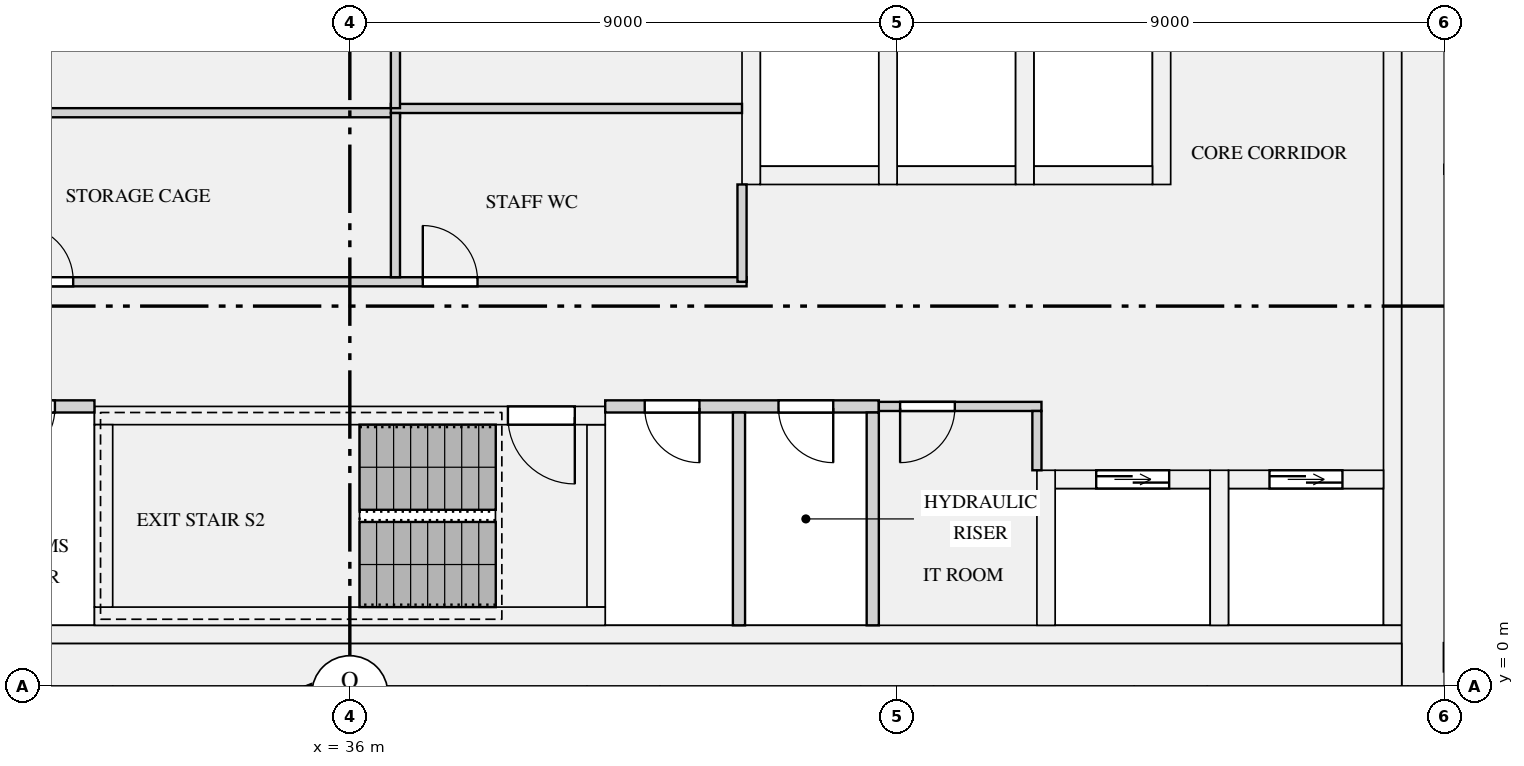
"""IFC4 building model, lengths in metres.
Left out: names, types, materials, properties, quantities, classifications, styles, units other than length and angle.
Written with IfcOpenShell. Run it as: python <this file> out.ifc"""

import sys

from ifc_helpers import new_model, si_unit, direction, frame, frame_2d, origin, place, context, subcontext, project, spatial, rectangle, extrude, element, fill, save


model = new_model("IFC4")
c1 = context("Model", 3, precision=1e-05, world=origin(), true_north=direction((0.0, 1.0)))
c2 = subcontext(c1, "Body", "Model", "MODEL_VIEW")
j1 = project(units=[si_unit("LENGTHUNIT", "METRE"), si_unit("PLANEANGLEUNIT", "RADIAN")], contexts=[c1])
p1 = place(None, origin())
s1 = spatial("IfcSite", under=j1, at=p1, CompositionType="ELEMENT")
p2 = place(p1, origin())
s2 = spatial("IfcBuilding", under=s1, at=p2, CompositionType="ELEMENT")
p3 = place(p2, frame((0.0, 0.0, 179.1)))
s3 = spatial("IfcBuildingStorey", under=s2, at=p3, CompositionType="ELEMENT", Elevation=179.1)
p4 = place(p3, frame((53.65, 0.0, 0.0), z_axis=(0.0, 0.0, 1.0), x_axis=(0.0, 1.0, 0.0)))
e1 = element("IfcWall", 1, at=p4, inside=s3, PredefinedType="SHEAR", context=c2, shape_type="SweptSolid", body=[
    extrude(rectangle(XDim=12.5, YDim=0.7, at=frame_2d((6.25, 0.0))), origin(), (0.0, 0.0, 1.0), 3.15),
])
p5 = place(p3, frame((18.7, 0.35, 0.0), z_axis=(0.0, 0.0, 1.0), x_axis=(1.0, 0.0, 0.0)))
e2 = element("IfcWall", 2, at=p5, inside=s3, PredefinedType="SHEAR", context=c2, shape_type="SweptSolid", body=[
    extrude(rectangle(XDim=34.6, YDim=0.7, at=frame_2d((17.3, 0.0))), origin(), (0.0, 0.0, 1.0), 3.15),
])
p6 = place(p3, frame((53.15, 1.0, 0.0), z_axis=(0.0, 0.0, 1.0), x_axis=(0.0, 1.0, 0.0)))
e3 = element("IfcWall", 3, at=p6, inside=s3, PredefinedType="SHEAR", context=c2, shape_type="SweptSolid", body=[
    extrude(rectangle(XDim=10.9, YDim=0.3, at=frame_2d((5.45, 0.0))), origin(), (0.0, 0.0, 1.0), 3.15),
])
p7 = place(p3, frame((18.7, 0.85, 0.0), z_axis=(0.0, 0.0, 1.0), x_axis=(1.0, 0.0, 0.0)))
e4 = element("IfcWall", 4, at=p7, inside=s3, PredefinedType="SHEAR", context=c2, shape_type="SweptSolid", body=[
    extrude(rectangle(XDim=34.6, YDim=0.3, at=frame_2d((17.3, 0.0))), origin(), (0.0, 0.0, 1.0), 3.15),
])
p8 = place(p3, frame((42.75, 8.4, 0.0), z_axis=(0.0, 0.0, 1.0), x_axis=(1.0, 0.0, 0.0)))
e5 = element("IfcWall", 5, at=p8, inside=s3, PredefinedType="SHEAR", context=c2, shape_type="SweptSolid", body=[
    extrude(rectangle(XDim=1.95, YDim=0.3, at=frame_2d((0.975, 0.0))), origin(), (0.0, 0.0, 1.0), 3.15),
])
p9 = place(p3, frame((42.6, 8.25, 0.0), z_axis=(0.0, 0.0, 1.0), x_axis=(0.0, 1.0, 0.0)))
e6 = element("IfcWall", 6, at=p9, inside=s3, PredefinedType="SHEAR", context=c2, shape_type="SweptSolid", body=[
    extrude(rectangle(XDim=3.65, YDim=0.3, at=frame_2d((1.825, 0.0))), origin(), (0.0, 0.0, 1.0), 3.15),
])
p10 = place(p3, frame((45.0, 8.4, 0.0), z_axis=(0.0, 0.0, 1.0), x_axis=(1.0, 0.0, 0.0)))
e7 = element("IfcWall", 7, at=p10, inside=s3, PredefinedType="SHEAR", context=c2, shape_type="SweptSolid", body=[
    extrude(rectangle(XDim=1.95, YDim=0.3, at=frame_2d((0.975, 0.0))), origin(), (0.0, 0.0, 1.0), 3.15),
])
p11 = place(p3, frame((44.85, 8.25, 0.0), z_axis=(0.0, 0.0, 1.0), x_axis=(0.0, 1.0, 0.0)))
e8 = element("IfcWall", 8, at=p11, inside=s3, PredefinedType="SHEAR", context=c2, shape_type="SweptSolid", body=[
    extrude(rectangle(XDim=3.65, YDim=0.3, at=frame_2d((1.825, 0.0))), origin(), (0.0, 0.0, 1.0), 3.15),
])
p12 = place(p3, frame((47.25, 8.4, 0.0), z_axis=(0.0, 0.0, 1.0), x_axis=(1.0, 0.0, 0.0)))
e9 = element("IfcWall", 9, at=p12, inside=s3, PredefinedType="SHEAR", context=c2, shape_type="SweptSolid", body=[
    extrude(rectangle(XDim=1.95, YDim=0.3, at=frame_2d((0.975, 0.0))), origin(), (0.0, 0.0, 1.0), 3.15),
])
for number, where, z_axis, x_axis in (
    (10, (47.1, 8.25, 0.0), (0.0, 0.0, 1.0), (0.0, 1.0, 0.0)),
    (11, (49.35, 8.25, 0.0), (0.0, 0.0, 1.0), (0.0, 1.0, 0.0)),
):
    element("IfcWall", number, at=place(p3, frame(where, z_axis=z_axis, x_axis=x_axis)), inside=s3, PredefinedType="SHEAR", context=c2, shape_type="SweptSolid", body=[
        extrude(rectangle(XDim=3.65, YDim=0.3, at=frame_2d((1.825, 0.0))), origin(), (0.0, 0.0, 1.0), 3.15),
    ])
p13 = place(p3, frame((47.6, 3.4, 0.0), z_axis=(0.0, 0.0, 1.0), x_axis=(1.0, 0.0, 0.0)))
e12 = element("IfcWall", 12, at=p13, inside=s3, PredefinedType="SHEAR", context=c2, shape_type="SweptSolid", body=[
    extrude(rectangle(XDim=2.55, YDim=0.3, at=frame_2d((1.275, 0.0))), origin(), (0.0, 0.0, 1.0), 3.15),
])
p14 = place(p13, frame((0.675, 0.0, 0.0)))
e13 = element("IfcOpeningElement", 13, at=p14, cuts=e12, PredefinedType="OPENING", context=c2, shape_type="SweptSolid", body=[
    extrude(rectangle(XDim=1.2, YDim=2.1, at=frame_2d((0.6, 1.05))), frame((0.0, 0.16, 0.0), z_axis=(0.0, -1.0, 0.0), x_axis=(1.0, 0.0, 0.0)), (0.0, 0.0, 1.0), 0.32),
])
p15 = place(p3, frame((47.45, 1.0, 0.0), z_axis=(0.0, 0.0, 1.0), x_axis=(0.0, 1.0, 0.0)))
e14 = element("IfcWall", 14, at=p15, inside=s3, PredefinedType="SHEAR", context=c2, shape_type="SweptSolid", body=[
    extrude(rectangle(XDim=2.55, YDim=0.3, at=frame_2d((1.275, 0.0))), origin(), (0.0, 0.0, 1.0), 3.15),
])
p16 = place(p3, frame((50.45, 3.4, 0.0), z_axis=(0.0, 0.0, 1.0), x_axis=(1.0, 0.0, 0.0)))
e15 = element("IfcWall", 15, at=p16, inside=s3, PredefinedType="SHEAR", context=c2, shape_type="SweptSolid", body=[
    extrude(rectangle(XDim=2.55, YDim=0.3, at=frame_2d((1.275, 0.0))), origin(), (0.0, 0.0, 1.0), 3.15),
])
p17 = place(p16, frame((0.675, 0.0, 0.0)))
e16 = element("IfcOpeningElement", 16, at=p17, cuts=e15, PredefinedType="OPENING", context=c2, shape_type="SweptSolid", body=[
    extrude(rectangle(XDim=1.2, YDim=2.1, at=frame_2d((0.6, 1.05))), frame((0.0, 0.16, 0.0), z_axis=(0.0, -1.0, 0.0), x_axis=(1.0, 0.0, 0.0)), (0.0, 0.0, 1.0), 0.32),
])
p18 = place(p3, frame((50.3, 1.0, 0.0), z_axis=(0.0, 0.0, 1.0), x_axis=(0.0, 1.0, 0.0)))
e17 = element("IfcWall", 17, at=p18, inside=s3, PredefinedType="SHEAR", context=c2, shape_type="SweptSolid", body=[
    extrude(rectangle(XDim=2.55, YDim=0.3, at=frame_2d((1.275, 0.0))), origin(), (0.0, 0.0, 1.0), 3.15),
])
p19 = place(p3, frame((31.8, 1.15, 0.0), z_axis=(0.0, 0.0, 1.0), x_axis=(1.0, 0.0, 0.0)))
e18 = element("IfcWall", 18, at=p19, inside=s3, PredefinedType="SHEAR", context=c2, shape_type="SweptSolid", body=[
    extrude(rectangle(XDim=8.4, YDim=0.3, at=frame_2d((4.2, 0.0))), origin(), (0.0, 0.0, 1.0), 3.15),
])
p20 = place(p3, frame((31.8, 4.45, 0.0), z_axis=(0.0, 0.0, 1.0), x_axis=(1.0, 0.0, 0.0)))
e19 = element("IfcWall", 19, at=p20, inside=s3, PredefinedType="SHEAR", context=c2, shape_type="SweptSolid", body=[
    extrude(rectangle(XDim=8.4, YDim=0.3, at=frame_2d((4.2, 0.0))), origin(), (0.0, 0.0, 1.0), 3.15),
])
p21 = place(p20, frame((6.8, 0.0, 0.0)))
e20 = element("IfcOpeningElement", 20, at=p21, cuts=e19, PredefinedType="OPENING", context=c2, shape_type="SweptSolid", body=[
    extrude(rectangle(XDim=1.1, YDim=2.1, at=frame_2d((0.55, 1.05))), frame((0.0, 0.16, 0.0), z_axis=(0.0, -1.0, 0.0), x_axis=(1.0, 0.0, 0.0)), (0.0, 0.0, 1.0), 0.32),
])
for number, where, z_axis, x_axis in (
    (21, (31.95, 1.3, 0.0), (0.0, 0.0, 1.0), (0.0, 1.0, 0.0)),
    (22, (40.05, 1.3, 0.0), (0.0, 0.0, 1.0), (0.0, 1.0, 0.0)),
):
    element("IfcWall", number, at=place(p3, frame(where, z_axis=z_axis, x_axis=x_axis)), inside=s3, PredefinedType="SHEAR", context=c2, shape_type="SweptSolid", body=[
        extrude(rectangle(XDim=3.0, YDim=0.3, at=frame_2d((1.5, 0.0))), origin(), (0.0, 0.0, 1.0), 3.15),
    ])
p22 = place(p3, frame((27.3, 4.6, 0.0), z_axis=(0.0, 0.0, 1.0), x_axis=(1.0, 0.0, 0.0)))
e23 = element("IfcWall", 23, at=p22, inside=s3, PredefinedType="PARTITIONING", context=c2, shape_type="SweptSolid", body=[
    extrude(rectangle(XDim=4.5, YDim=0.2, at=frame_2d((2.25, 0.0))), origin(), (0.0, 0.0, 1.0), 2.83),
])
p23 = place(p22, frame((0.75, 0.0, 0.0)))
e24 = element("IfcOpeningElement", 24, at=p23, cuts=e23, PredefinedType="OPENING", context=c2, shape_type="SweptSolid", body=[
    extrude(rectangle(XDim=0.9, YDim=2.1, at=frame_2d((0.45, 1.05))), frame((0.0, 0.11, 0.0), z_axis=(0.0, -1.0, 0.0), x_axis=(1.0, 0.0, 0.0)), (0.0, 0.0, 1.0), 0.22),
])
p24 = place(p22, frame((2.95, 0.0, 0.0)))
e25 = element("IfcOpeningElement", 25, at=p24, cuts=e23, PredefinedType="OPENING", context=c2, shape_type="SweptSolid", body=[
    extrude(rectangle(XDim=0.9, YDim=2.1, at=frame_2d((0.45, 1.05))), frame((0.0, 0.11, 0.0), z_axis=(0.0, -1.0, 0.0), x_axis=(1.0, 0.0, 0.0)), (0.0, 0.0, 1.0), 0.22),
])
p25 = place(p3, frame((40.2, 4.6, 0.0), z_axis=(0.0, 0.0, 1.0), x_axis=(1.0, 0.0, 0.0)))
e26 = element("IfcWall", 26, at=p25, inside=s3, PredefinedType="PARTITIONING", context=c2, shape_type="SweptSolid", body=[
    extrude(rectangle(XDim=4.5, YDim=0.2, at=frame_2d((2.25, 0.0))), origin(), (0.0, 0.0, 1.0), 2.83),
])
p26 = place(p25, frame((0.65, 0.0, 0.0)))
e27 = element("IfcOpeningElement", 27, at=p26, cuts=e26, PredefinedType="OPENING", context=c2, shape_type="SweptSolid", body=[
    extrude(rectangle(XDim=0.9, YDim=2.1, at=frame_2d((0.45, 1.05))), frame((0.0, 0.11, 0.0), z_axis=(0.0, -1.0, 0.0), x_axis=(1.0, 0.0, 0.0)), (0.0, 0.0, 1.0), 0.22),
])
p27 = place(p25, frame((2.85, 0.0, 0.0)))
e28 = element("IfcOpeningElement", 28, at=p27, cuts=e26, PredefinedType="OPENING", context=c2, shape_type="SweptSolid", body=[
    extrude(rectangle(XDim=0.9, YDim=2.1, at=frame_2d((0.45, 1.05))), frame((0.0, 0.11, 0.0), z_axis=(0.0, -1.0, 0.0), x_axis=(1.0, 0.0, 0.0)), (0.0, 0.0, 1.0), 0.22),
])
p28 = place(p3, frame((44.7, 4.6, 0.0), z_axis=(0.0, 0.0, 1.0), x_axis=(1.0, 0.0, 0.0)))
e29 = element("IfcWall", 29, at=p28, inside=s3, PredefinedType="PARTITIONING", context=c2, shape_type="SweptSolid", body=[
    extrude(rectangle(XDim=2.675, YDim=0.15, at=frame_2d((1.337, 0.0))), origin(), (0.0, 0.0, 1.0), 2.83),
])
p29 = place(p28, frame((0.35, 0.0, 0.0)))
e30 = element("IfcOpeningElement", 30, at=p29, cuts=e29, PredefinedType="OPENING", context=c2, shape_type="SweptSolid", body=[
    extrude(rectangle(XDim=0.9, YDim=2.1, at=frame_2d((0.45, 1.05))), frame((0.0, 0.085, 0.0), z_axis=(0.0, -1.0, 0.0), x_axis=(1.0, 0.0, 0.0)), (0.0, 0.0, 1.0), 0.17),
])
p30 = place(p3, frame((22.725, 6.65, 0.0), z_axis=(0.0, 0.0, 1.0), x_axis=(1.0, 0.0, 0.0)))
e31 = element("IfcWall", 31, at=p30, inside=s3, PredefinedType="PARTITIONING", context=c2, shape_type="SweptSolid", body=[
    extrude(rectangle(XDim=19.8, YDim=0.15, at=frame_2d((9.9, 0.0))), origin(), (0.0, 0.0, 1.0), 2.83),
])
p31 = place(p30, frame((0.825, 0.0, 0.0)))
e32 = element("IfcOpeningElement", 32, at=p31, cuts=e31, PredefinedType="OPENING", context=c2, shape_type="SweptSolid", body=[
    extrude(rectangle(XDim=0.9, YDim=2.1, at=frame_2d((0.45, 1.05))), frame((0.0, 0.085, 0.0), z_axis=(0.0, -1.0, 0.0), x_axis=(1.0, 0.0, 0.0)), (0.0, 0.0, 1.0), 0.17),
])
p32 = place(p30, frame((7.825, 0.0, 0.0)))
e33 = element("IfcOpeningElement", 33, at=p32, cuts=e31, PredefinedType="OPENING", context=c2, shape_type="SweptSolid", body=[
    extrude(rectangle(XDim=0.9, YDim=2.1, at=frame_2d((0.45, 1.05))), frame((0.0, 0.085, 0.0), z_axis=(0.0, -1.0, 0.0), x_axis=(1.0, 0.0, 0.0)), (0.0, 0.0, 1.0), 0.17),
])
p33 = place(p30, frame((14.475, 0.0, 0.0)))
e34 = element("IfcOpeningElement", 34, at=p33, cuts=e31, PredefinedType="OPENING", context=c2, shape_type="SweptSolid", body=[
    extrude(rectangle(XDim=0.9, YDim=2.1, at=frame_2d((0.45, 1.05))), frame((0.0, 0.085, 0.0), z_axis=(0.0, -1.0, 0.0), x_axis=(1.0, 0.0, 0.0)), (0.0, 0.0, 1.0), 0.17),
])
p34 = place(p3, frame((22.725, 9.43, 0.0), z_axis=(0.0, 0.0, 1.0), x_axis=(1.0, 0.0, 0.0)))
e35 = element("IfcWall", 35, at=p34, inside=s3, PredefinedType="PARTITIONING", context=c2, shape_type="SweptSolid", body=[
    extrude(rectangle(XDim=14.1, YDim=0.15, at=frame_2d((7.05, 0.0))), origin(), (0.0, 0.0, 1.0), 2.83),
])
p35 = place(p3, frame((36.675, 9.5, 0.0), z_axis=(0.0, 0.0, 1.0), x_axis=(1.0, 0.0, 0.0)))
e36 = element("IfcWall", 36, at=p35, inside=s3, PredefinedType="PARTITIONING", context=c2, shape_type="SweptSolid", body=[
    extrude(rectangle(XDim=5.775, YDim=0.15, at=frame_2d((2.887, 0.0))), origin(), (0.0, 0.0, 1.0), 2.83),
])
for number, where, z_axis, x_axis in (
    (37, (42.4, 1.0, 0.0), (0.0, 0.0, 1.0), (0.0, 1.0, 0.0)),
    (38, (44.6, 1.0, 0.0), (0.0, 0.0, 1.0), (0.0, 1.0, 0.0)),
):
    element("IfcWall", number, at=place(p3, frame(where, z_axis=z_axis, x_axis=x_axis)), inside=s3, PredefinedType="PARTITIONING", context=c2, shape_type="SweptSolid", body=[
        extrude(rectangle(XDim=3.5, YDim=0.2, at=frame_2d((1.75, 0.0))), origin(), (0.0, 0.0, 1.0), 2.83),
    ])
p36 = place(p3, frame((47.3, 3.55, 0.0), z_axis=(0.0, 0.0, 1.0), x_axis=(0.0, 1.0, 0.0)))
e39 = element("IfcWall", 39, at=p36, inside=s3, PredefinedType="PARTITIONING", context=c2, shape_type="SweptSolid", body=[
    extrude(rectangle(XDim=0.975, YDim=0.15, at=frame_2d((0.487, 0.0))), origin(), (0.0, 0.0, 1.0), 2.83),
])
p37 = place(p3, frame((42.45, 6.65, 0.0), z_axis=(0.0, 0.0, 1.0), x_axis=(0.0, 1.0, 0.0)))
e40 = element("IfcWall", 40, at=p37, inside=s3, PredefinedType="PARTITIONING", context=c2, shape_type="SweptSolid", body=[
    extrude(rectangle(XDim=1.6, YDim=0.15, at=frame_2d((0.8, 0.0))), origin(), (0.0, 0.0, 1.0), 2.83),
])
p38 = place(p3, frame((36.75, 6.725, 0.0), z_axis=(0.0, 0.0, 1.0), x_axis=(0.0, 1.0, 0.0)))
e41 = element("IfcWall", 41, at=p38, inside=s3, PredefinedType="PARTITIONING", context=c2, shape_type="SweptSolid", body=[
    extrude(rectangle(XDim=2.7, YDim=0.15, at=frame_2d((1.35, 0.0))), origin(), (0.0, 0.0, 1.0), 2.83),
])
p39 = place(p3, frame((36.75, 9.505, 0.0), z_axis=(0.0, 0.0, 1.0), x_axis=(0.0, 1.0, 0.0)))
e42 = element("IfcWall", 42, at=p39, inside=s3, PredefinedType="PARTITIONING", context=c2, shape_type="SweptSolid", body=[
    extrude(rectangle(XDim=2.395, YDim=0.15, at=frame_2d((1.198, 0.0))), origin(), (0.0, 0.0, 1.0), 2.83),
])
p40 = place(p3, frame((54.0, 8.5, 0.0), z_axis=(0.0, 0.0, 1.0), x_axis=(1.0, 0.0, 0.0)))
e43 = element("IfcWall", 43, at=p40, inside=s3, PredefinedType="PARTITIONING", context=c2, shape_type="SweptSolid", body=[
    extrude(rectangle(XDim=17.3, YDim=0.15, at=frame_2d((8.65, 0.0))), origin(), (0.0, 0.0, 1.0), 2.83),
])
p41 = place(p40, frame((1.8, 0.0, 0.0)))
e44 = element("IfcOpeningElement", 44, at=p41, cuts=e43, PredefinedType="OPENING", context=c2, shape_type="SweptSolid", body=[
    extrude(rectangle(XDim=0.9, YDim=2.1, at=frame_2d((0.45, 1.05))), frame((0.0, 0.085, 0.0), z_axis=(0.0, -1.0, 0.0), x_axis=(1.0, 0.0, 0.0)), (0.0, 0.0, 1.0), 0.17),
])
p42 = place(p40, frame((6.3, 0.0, 0.0)))
e45 = element("IfcOpeningElement", 45, at=p42, cuts=e43, PredefinedType="OPENING", context=c2, shape_type="SweptSolid", body=[
    extrude(rectangle(XDim=0.9, YDim=2.1, at=frame_2d((0.45, 1.05))), frame((0.0, 0.085, 0.0), z_axis=(0.0, -1.0, 0.0), x_axis=(1.0, 0.0, 0.0)), (0.0, 0.0, 1.0), 0.17),
])
p43 = place(p40, frame((10.8, 0.0, 0.0)))
e46 = element("IfcOpeningElement", 46, at=p43, cuts=e43, PredefinedType="OPENING", context=c2, shape_type="SweptSolid", body=[
    extrude(rectangle(XDim=0.9, YDim=2.1, at=frame_2d((0.45, 1.05))), frame((0.0, 0.085, 0.0), z_axis=(0.0, -1.0, 0.0), x_axis=(1.0, 0.0, 0.0)), (0.0, 0.0, 1.0), 0.17),
])
p44 = place(p14, origin())
e47 = element("IfcDoor", 47, at=p44, inside=s3, OperationType="DOUBLE_DOOR_SLIDING", PredefinedType="DOOR", context=c2, shape_type="SweptSolid", body=[
    extrude(rectangle(XDim=1.2, YDim=2.1, at=frame_2d((0.6, 1.05))), frame((0.0, 0.025, 0.0), z_axis=(0.0, -1.0, 0.0), x_axis=(1.0, 0.0, 0.0)), (0.0, 0.0, 1.0), 0.05),
])
fill(e13, e47)
p45 = place(p17, origin())
e48 = element("IfcDoor", 48, at=p45, inside=s3, OperationType="DOUBLE_DOOR_SLIDING", PredefinedType="DOOR", context=c2, shape_type="SweptSolid", body=[
    extrude(rectangle(XDim=1.2, YDim=2.1, at=frame_2d((0.6, 1.05))), frame((0.0, 0.025, 0.0), z_axis=(0.0, -1.0, 0.0), x_axis=(1.0, 0.0, 0.0)), (0.0, 0.0, 1.0), 0.05),
])
fill(e16, e48)
p46 = place(p21, frame((1.1, 0.0, 0.0), z_axis=(0.0, 0.0, 1.0), x_axis=(-1.0, 0.0, 0.0)))
e49 = element("IfcDoor", 49, at=p46, inside=s3, OperationType="SINGLE_SWING_LEFT", PredefinedType="DOOR", context=c2, shape_type="SweptSolid", body=[
    extrude(rectangle(XDim=1.1, YDim=2.1, at=frame_2d((0.55, 1.05))), frame((0.0, 0.025, 0.0), z_axis=(0.0, -1.0, 0.0), x_axis=(1.0, 0.0, 0.0)), (0.0, 0.0, 1.0), 0.05),
])
fill(e20, e49)
p47 = place(p29, frame((0.9, 0.0, 0.0), z_axis=(0.0, 0.0, 1.0), x_axis=(-1.0, 0.0, 0.0)))
e50 = element("IfcDoor", 50, at=p47, inside=s3, OperationType="SINGLE_SWING_RIGHT", PredefinedType="DOOR", context=c2, shape_type="SweptSolid", body=[
    extrude(rectangle(XDim=0.9, YDim=2.1, at=frame_2d((0.45, 1.05))), frame((0.0, 0.025, 0.0), z_axis=(0.0, -1.0, 0.0), x_axis=(1.0, 0.0, 0.0)), (0.0, 0.0, 1.0), 0.05),
])
fill(e30, e50)
p48 = place(p32, origin())
e51 = element("IfcDoor", 51, at=p48, inside=s3, OperationType="SINGLE_SWING_LEFT", PredefinedType="DOOR", context=c2, shape_type="SweptSolid", body=[
    extrude(rectangle(XDim=0.9, YDim=2.1, at=frame_2d((0.45, 1.05))), frame((0.0, 0.025, 0.0), z_axis=(0.0, -1.0, 0.0), x_axis=(1.0, 0.0, 0.0)), (0.0, 0.0, 1.0), 0.05),
])
fill(e33, e51)
p49 = place(p33, origin())
e52 = element("IfcDoor", 52, at=p49, inside=s3, OperationType="SINGLE_SWING_LEFT", PredefinedType="DOOR", context=c2, shape_type="SweptSolid", body=[
    extrude(rectangle(XDim=0.9, YDim=2.1, at=frame_2d((0.45, 1.05))), frame((0.0, 0.025, 0.0), z_axis=(0.0, -1.0, 0.0), x_axis=(1.0, 0.0, 0.0)), (0.0, 0.0, 1.0), 0.05),
])
fill(e34, e52)
p50 = place(p24, frame((0.9, 0.0, 0.0), z_axis=(0.0, 0.0, 1.0), x_axis=(-1.0, 0.0, 0.0)))
e53 = element("IfcDoor", 53, at=p50, inside=s3, OperationType="SINGLE_SWING_RIGHT", PredefinedType="DOOR", context=c2, shape_type="SweptSolid", body=[
    extrude(rectangle(XDim=0.9, YDim=2.1, at=frame_2d((0.45, 1.05))), frame((0.0, 0.025, 0.0), z_axis=(0.0, -1.0, 0.0), x_axis=(1.0, 0.0, 0.0)), (0.0, 0.0, 1.0), 0.05),
])
fill(e25, e53)
p51 = place(p26, frame((0.9, 0.0, 0.0), z_axis=(0.0, 0.0, 1.0), x_axis=(-1.0, 0.0, 0.0)))
e54 = element("IfcDoor", 54, at=p51, inside=s3, OperationType="SINGLE_SWING_LEFT", PredefinedType="DOOR", context=c2, shape_type="SweptSolid", body=[
    extrude(rectangle(XDim=0.9, YDim=2.1, at=frame_2d((0.45, 1.05))), frame((0.0, 0.025, 0.0), z_axis=(0.0, -1.0, 0.0), x_axis=(1.0, 0.0, 0.0)), (0.0, 0.0, 1.0), 0.05),
])
fill(e27, e54)
p52 = place(p27, frame((0.9, 0.0, 0.0), z_axis=(0.0, 0.0, 1.0), x_axis=(-1.0, 0.0, 0.0)))
e55 = element("IfcDoor", 55, at=p52, inside=s3, OperationType="SINGLE_SWING_LEFT", PredefinedType="DOOR", context=c2, shape_type="SweptSolid", body=[
    extrude(rectangle(XDim=0.9, YDim=2.1, at=frame_2d((0.45, 1.05))), frame((0.0, 0.025, 0.0), z_axis=(0.0, -1.0, 0.0), x_axis=(1.0, 0.0, 0.0)), (0.0, 0.0, 1.0), 0.05),
])
fill(e28, e55)
save(model, sys.argv[1])
